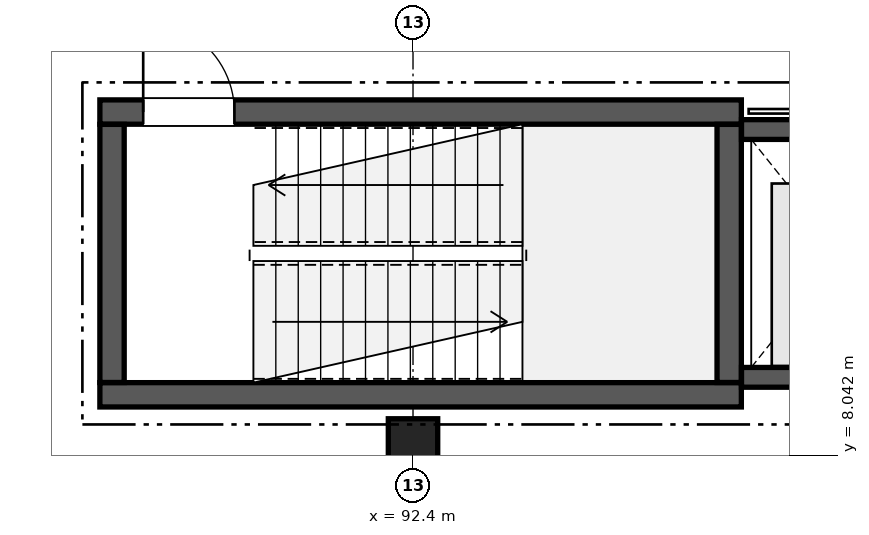
"""IFC4 building model, lengths in metres.
Left out: names, types, materials, properties, quantities, classifications, styles, units other than length and angle.
Written with IfcOpenShell. Run it as: python <this file> out.ifc"""

import sys

from ifc_helpers import new_model, si_unit, direction, frame, frame_2d, origin, origin_2d, place, context, subcontext, project, spatial, rectangle, extrude, element, fill, save


model = new_model("IFC4")
c1 = context("Model", 3, precision=1e-05, world=origin(), true_north=direction((0.0, 1.0)))
c2 = subcontext(c1, "Body", "Model", "MODEL_VIEW")
j1 = project(units=[si_unit("LENGTHUNIT", "METRE"), si_unit("PLANEANGLEUNIT", "RADIAN")], contexts=[c1])
p1 = place(None, origin())
s1 = spatial("IfcSite", under=j1, at=p1, CompositionType="ELEMENT")
p2 = place(p1, origin())
s2 = spatial("IfcBuilding", under=s1, at=p2, CompositionType="ELEMENT")
p3 = place(p2, frame((0.0, 0.0, -4.42)))
s3 = spatial("IfcBuildingStorey", under=s2, at=p3, CompositionType="ELEMENT", Elevation=-4.42)
p4 = place(p3, frame((92.4, 8.2, 0.0), z_axis=(0.0, 0.0, 1.0), x_axis=(1.0, 0.0, 0.0)))
e1 = element("IfcColumn", 1, at=p4, inside=s3, PredefinedType="COLUMN", context=c2, shape_type="SweptSolid", body=[
    extrude(rectangle(XDim=0.65, YDim=0.65, at=origin_2d()), origin(), (0.0, 0.0, 1.0), 4.42),
])
p5 = place(p3, frame((88.28, 8.84, 0.0), z_axis=(0.0, 0.0, 1.0), x_axis=(1.0, 0.0, 0.0)))
e2 = element("IfcWall", 2, at=p5, inside=s3, PredefinedType="SHEAR", context=c2, shape_type="SweptSolid", body=[
    extrude(rectangle(XDim=8.44, YDim=0.32, at=frame_2d((4.22, 0.0))), origin(), (0.0, 0.0, 1.0), 4.09),
])
p6 = place(p3, frame((88.28, 12.56, 0.0), z_axis=(0.0, 0.0, 1.0), x_axis=(1.0, 0.0, 0.0)))
e3 = element("IfcWall", 3, at=p6, inside=s3, PredefinedType="SHEAR", context=c2, shape_type="SweptSolid", body=[
    extrude(rectangle(XDim=8.44, YDim=0.32, at=frame_2d((4.22, 0.0))), origin(), (0.0, 0.0, 1.0), 4.09),
])
p7 = place(p6, frame((0.57, 0.0, 0.0)))
e4 = element("IfcOpeningElement", 4, at=p7, cuts=e3, PredefinedType="OPENING", context=c2, shape_type="SweptSolid", body=[
    extrude(rectangle(XDim=1.2, YDim=2.2, at=frame_2d((0.6, 1.1))), frame((0.0, 0.17, 0.0), z_axis=(0.0, -1.0, 0.0), x_axis=(1.0, 0.0, 0.0)), (0.0, 0.0, 1.0), 0.34),
])
for number, where, z_axis, x_axis in (
    (5, (88.44, 9.002, 0.0), (0.0, 0.0, 1.0), (0.0, 1.0, 0.0)),
    (6, (96.56, 9.002, 0.0), (0.0, 0.0, 1.0), (0.0, 1.0, 0.0)),
):
    element("IfcWall", number, at=place(p3, frame(where, z_axis=z_axis, x_axis=x_axis)), inside=s3, PredefinedType="SHEAR", context=c2, shape_type="SweptSolid", body=[
        extrude(rectangle(XDim=3.396, YDim=0.32, at=frame_2d((1.698, 0.0))), origin(), (0.0, 0.0, 1.0), 4.09),
    ])
p8 = place(p3, frame((96.722, 9.07, 0.0), z_axis=(0.0, 0.0, 1.0), x_axis=(1.0, 0.0, 0.0)))
e7 = element("IfcWall", 7, at=p8, inside=s3, PredefinedType="SHEAR", context=c2, shape_type="SweptSolid", body=[
    extrude(rectangle(XDim=2.658, YDim=0.26, at=frame_2d((1.329, 0.0))), origin(), (0.0, 0.0, 1.0), 4.09),
])
p9 = place(p3, frame((96.722, 12.33, 0.0), z_axis=(0.0, 0.0, 1.0), x_axis=(1.0, 0.0, 0.0)))
e8 = element("IfcWall", 8, at=p9, inside=s3, PredefinedType="SHEAR", context=c2, shape_type="SweptSolid", body=[
    extrude(rectangle(XDim=2.658, YDim=0.26, at=frame_2d((1.329, 0.0))), origin(), (0.0, 0.0, 1.0), 4.09),
])
p10 = place(p9, frame((0.679, 0.0, 0.0)))
e9 = element("IfcOpeningElement", 9, at=p10, cuts=e8, PredefinedType="OPENING", context=c2, shape_type="SweptSolid", body=[
    extrude(rectangle(XDim=1.3, YDim=2.2, at=frame_2d((0.65, 1.1))), frame((0.0, 0.14, 0.0), z_axis=(0.0, -1.0, 0.0), x_axis=(1.0, 0.0, 0.0)), (0.0, 0.0, 1.0), 0.28),
])
p11 = place(p7, origin())
e10 = element("IfcDoor", 10, at=p11, inside=s3, OperationType="SINGLE_SWING_LEFT", PredefinedType="DOOR", context=c2, shape_type="SweptSolid", body=[
    extrude(rectangle(XDim=1.2, YDim=2.2, at=frame_2d((0.6, 1.1))), frame((0.0, 0.025, 0.0), z_axis=(0.0, -1.0, 0.0), x_axis=(1.0, 0.0, 0.0)), (0.0, 0.0, 1.0), 0.05),
])
fill(e4, e10)
save(model, sys.argv[1])
